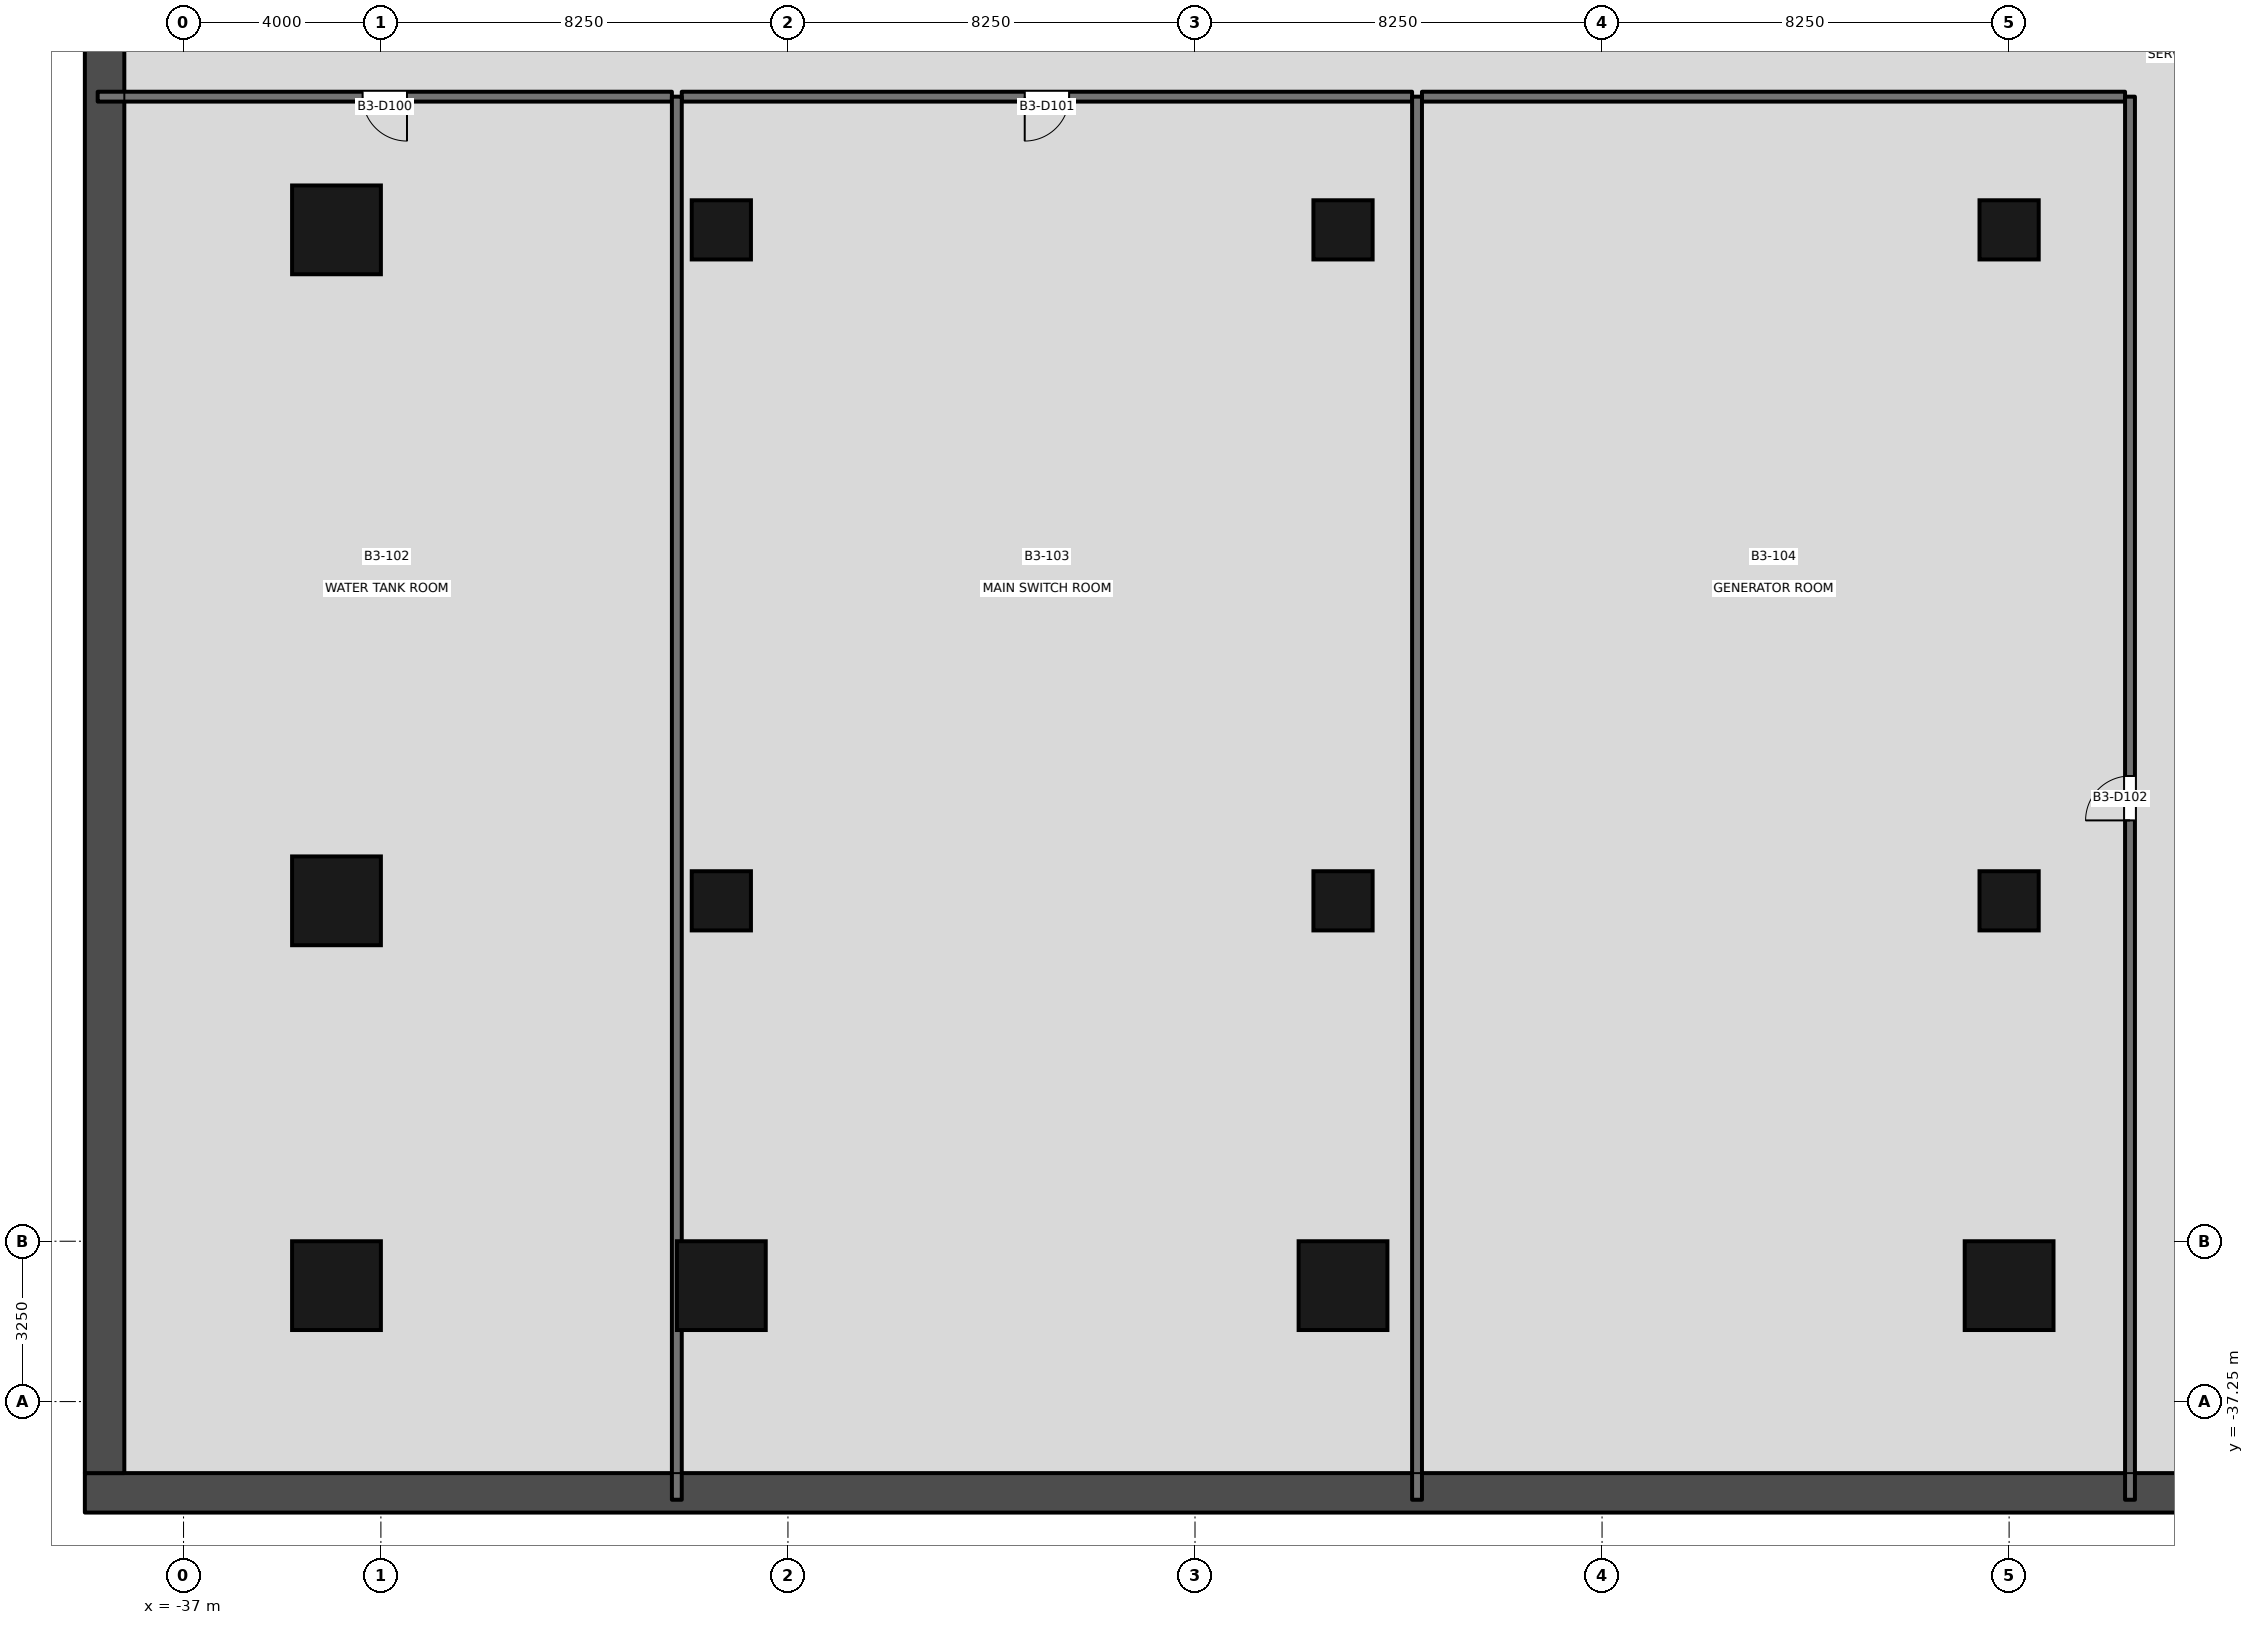
"""IFC4 building model, lengths in metres.
Left out: names, types, materials, properties, quantities, classifications, styles, units other than length and angle.
Written with IfcOpenShell. Run it as: python <this file> out.ifc"""

import sys

from ifc_helpers import new_model, si_unit, direction, frame, frame_2d, origin, origin_2d, place, context, subcontext, project, spatial, rectangle, extrude, element, fill, save


model = new_model("IFC4")
c1 = context("Model", 3, precision=1e-05, world=origin(), true_north=direction((0.0, 1.0)))
c2 = subcontext(c1, "Body", "Model", "MODEL_VIEW")
j1 = project(units=[si_unit("LENGTHUNIT", "METRE"), si_unit("PLANEANGLEUNIT", "RADIAN")], contexts=[c1])
p1 = place(None, origin())
s1 = spatial("IfcSite", under=j1, at=p1, CompositionType="ELEMENT")
p2 = place(p1, origin())
s2 = spatial("IfcBuilding", under=s1, at=p2, CompositionType="ELEMENT")
p3 = place(p2, frame((0.0, 0.0, -13.5)))
s3 = spatial("IfcBuildingStorey", under=s2, at=p3, CompositionType="ELEMENT", Elevation=-13.5)
p4 = place(p3, frame((-39.0, -39.1, -0.25), z_axis=(0.0, 0.0, 1.0), x_axis=(1.0, 0.0, 0.0)))
e1 = element("IfcWall", 1, at=p4, inside=s3, PredefinedType="SOLIDWALL", context=c2, shape_type="SweptSolid", body=[
    extrude(rectangle(XDim=78.0, YDim=0.8, at=frame_2d((39.0, 0.0))), origin(), (0.0, 0.0, 1.0), 4.05),
])
p5 = place(p3, frame((-38.6, -38.7, -0.25), z_axis=(0.0, 0.0, 1.0), x_axis=(0.0, 1.0, 0.0)))
e2 = element("IfcWall", 2, at=p5, inside=s3, PredefinedType="SOLIDWALL", context=c2, shape_type="SweptSolid", body=[
    extrude(rectangle(XDim=51.9, YDim=0.8, at=frame_2d((25.95, 0.0))), origin(), (0.0, 0.0, 1.0), 4.05),
])
for number, where, z_axis, x_axis in (
    (3, (-33.9, -34.9, -0.25), (0.0, 0.0, 1.0), (1.0, 0.0, 0.0)),
    (4, (-26.1, -34.9, -0.25), (0.0, 0.0, 1.0), (1.0, 0.0, 0.0)),
    (5, (-13.5, -34.9, -0.25), (0.0, 0.0, 1.0), (1.0, 0.0, 0.0)),
    (6, (0.0, -34.9, -0.25), (0.0, 0.0, 1.0), (1.0, 0.0, 0.0)),
    (7, (-33.9, -27.1, -0.25), (0.0, 0.0, 1.0), (0.0, 1.0, 0.0)),
    (8, (-33.9, -13.5, -0.25), (0.0, 0.0, 1.0), (0.0, 1.0, 0.0)),
):
    element("IfcColumn", number, at=place(p3, frame(where, z_axis=z_axis, x_axis=x_axis)), inside=s3, PredefinedType="COLUMN", context=c2, shape_type="SweptSolid", body=[
        extrude(rectangle(XDim=1.8, YDim=1.8, at=origin_2d()), origin(), (0.0, 0.0, 1.0), 4.05),
    ])
for number, where, z_axis, x_axis in (
    (9, (-26.1, -27.1, -0.25), (0.0, 0.0, 1.0), (1.0, 0.0, 0.0)),
    (10, (-13.5, -27.1, -0.25), (0.0, 0.0, 1.0), (1.0, 0.0, 0.0)),
    (11, (0.0, -27.1, -0.25), (0.0, 0.0, 1.0), (1.0, 0.0, 0.0)),
    (12, (-26.1, -13.5, -0.25), (0.0, 0.0, 1.0), (1.0, 0.0, 0.0)),
    (13, (-13.5, -13.5, -0.25), (0.0, 0.0, 1.0), (1.0, 0.0, 0.0)),
    (14, (0.0, -13.5, -0.25), (0.0, 0.0, 1.0), (1.0, 0.0, 0.0)),
):
    element("IfcColumn", number, at=place(p3, frame(where, z_axis=z_axis, x_axis=x_axis)), inside=s3, PredefinedType="COLUMN", context=c2, shape_type="SweptSolid", body=[
        extrude(rectangle(XDim=1.2, YDim=1.2, at=origin_2d()), origin(), (0.0, 0.0, 1.0), 4.05),
    ])
p6 = place(p3, frame((-27.102, -10.8, 0.0), z_axis=(0.0, 0.0, 1.0), x_axis=(-1.0, 0.0, 0.0)))
e15 = element("IfcWall", 15, at=p6, inside=s3, PredefinedType="PARTITIONING", context=c2, shape_type="SweptSolid", body=[
    extrude(rectangle(XDim=11.638, YDim=0.2, at=frame_2d((5.819, 0.0))), origin(), (0.0, 0.0, 1.0), 2.8),
])
p7 = place(p6, frame((5.369, 0.0, 0.0)))
e16 = element("IfcOpeningElement", 16, at=p7, cuts=e15, PredefinedType="OPENING", context=c2, shape_type="SweptSolid", body=[
    extrude(rectangle(XDim=0.9, YDim=2.1, at=frame_2d((0.45, 1.05))), frame((0.0, 0.111, 0.0), z_axis=(0.0, -1.0, 0.0), x_axis=(1.0, 0.0, 0.0)), (0.0, 0.0, 1.0), 0.221),
])
p8 = place(p3, frame((-12.1, -10.8, 0.0), z_axis=(0.0, 0.0, 1.0), x_axis=(-1.0, 0.0, 0.0)))
e17 = element("IfcWall", 17, at=p8, inside=s3, PredefinedType="PARTITIONING", context=c2, shape_type="SweptSolid", body=[
    extrude(rectangle(XDim=14.802, YDim=0.2, at=frame_2d((7.401, 0.0))), origin(), (0.0, 0.0, 1.0), 2.4),
])
p9 = place(p8, frame((6.951, 0.0, 0.0)))
e18 = element("IfcOpeningElement", 18, at=p9, cuts=e17, PredefinedType="OPENING", context=c2, shape_type="SweptSolid", body=[
    extrude(rectangle(XDim=0.9, YDim=2.1, at=frame_2d((0.45, 1.05))), frame((0.0, 0.111, 0.0), z_axis=(0.0, -1.0, 0.0), x_axis=(1.0, 0.0, 0.0)), (0.0, 0.0, 1.0), 0.221),
])
p10 = place(p3, frame((2.35, -10.8, 0.0), z_axis=(0.0, 0.0, 1.0), x_axis=(-1.0, 0.0, 0.0)))
e19 = element("IfcWall", 19, at=p10, inside=s3, PredefinedType="PARTITIONING", context=c2, shape_type="SweptSolid", body=[
    extrude(rectangle(XDim=14.25, YDim=0.2, at=frame_2d((7.125, 0.0))), origin(), (0.0, 0.0, 1.0), 2.4),
])
p11 = place(p3, frame((2.45, -39.24, 0.0), z_axis=(0.0, 0.0, 1.0), x_axis=(0.0, 1.0, 0.0)))
e20 = element("IfcWall", 20, at=p11, inside=s3, PredefinedType="PARTITIONING", context=c2, shape_type="SweptSolid", body=[
    extrude(rectangle(XDim=28.44, YDim=0.2, at=frame_2d((14.22, 0.0))), origin(), (0.0, 0.0, 1.0), 2.8),
])
p12 = place(p11, frame((13.77, 0.0, 0.0)))
e21 = element("IfcOpeningElement", 21, at=p12, cuts=e20, PredefinedType="OPENING", context=c2, shape_type="SweptSolid", body=[
    extrude(rectangle(XDim=0.9, YDim=2.1, at=frame_2d((0.45, 1.05))), frame((0.0, 0.111, 0.0), z_axis=(0.0, -1.0, 0.0), x_axis=(1.0, 0.0, 0.0)), (0.0, 0.0, 1.0), 0.221),
])
for number, where, z_axis, x_axis in (
    (22, (-27.002, -10.8, 0.0), (0.0, 0.0, 1.0), (0.0, -1.0, 0.0)),
    (23, (-12.0, -10.8, 0.0), (0.0, 0.0, 1.0), (0.0, -1.0, 0.0)),
):
    element("IfcWall", number, at=place(p3, frame(where, z_axis=z_axis, x_axis=x_axis)), inside=s3, PredefinedType="PARTITIONING", context=c2, shape_type="SweptSolid", body=[
        extrude(rectangle(XDim=28.44, YDim=0.2, at=frame_2d((14.22, 0.0))), origin(), (0.0, 0.0, 1.0), 2.8),
    ])
p13 = place(p7, origin())
e24 = element("IfcDoor", 24, at=p13, inside=s3, OperationType="SINGLE_SWING_LEFT", PredefinedType="DOOR", context=c2, shape_type="SweptSolid", body=[
    extrude(rectangle(XDim=0.9, YDim=2.1, at=frame_2d((0.45, 1.05))), frame((0.0, 0.025, 0.0), z_axis=(0.0, -1.0, 0.0), x_axis=(1.0, 0.0, 0.0)), (0.0, 0.0, 1.0), 0.05),
])
fill(e16, e24)
p14 = place(p9, origin())
e25 = element("IfcDoor", 25, at=p14, inside=s3, OperationType="SINGLE_SWING_RIGHT", PredefinedType="DOOR", context=c2, shape_type="SweptSolid", body=[
    extrude(rectangle(XDim=0.9, YDim=2.1, at=frame_2d((0.45, 1.05))), frame((0.0, 0.025, 0.0), z_axis=(0.0, -1.0, 0.0), x_axis=(1.0, 0.0, 0.0)), (0.0, 0.0, 1.0), 0.05),
])
fill(e18, e25)
p15 = place(p12, origin())
e26 = element("IfcDoor", 26, at=p15, inside=s3, OperationType="SINGLE_SWING_LEFT", PredefinedType="DOOR", context=c2, shape_type="SweptSolid", body=[
    extrude(rectangle(XDim=0.9, YDim=2.1, at=frame_2d((0.45, 1.05))), frame((0.0, 0.025, 0.0), z_axis=(0.0, -1.0, 0.0), x_axis=(1.0, 0.0, 0.0)), (0.0, 0.0, 1.0), 0.05),
])
fill(e21, e26)
save(model, sys.argv[1])
